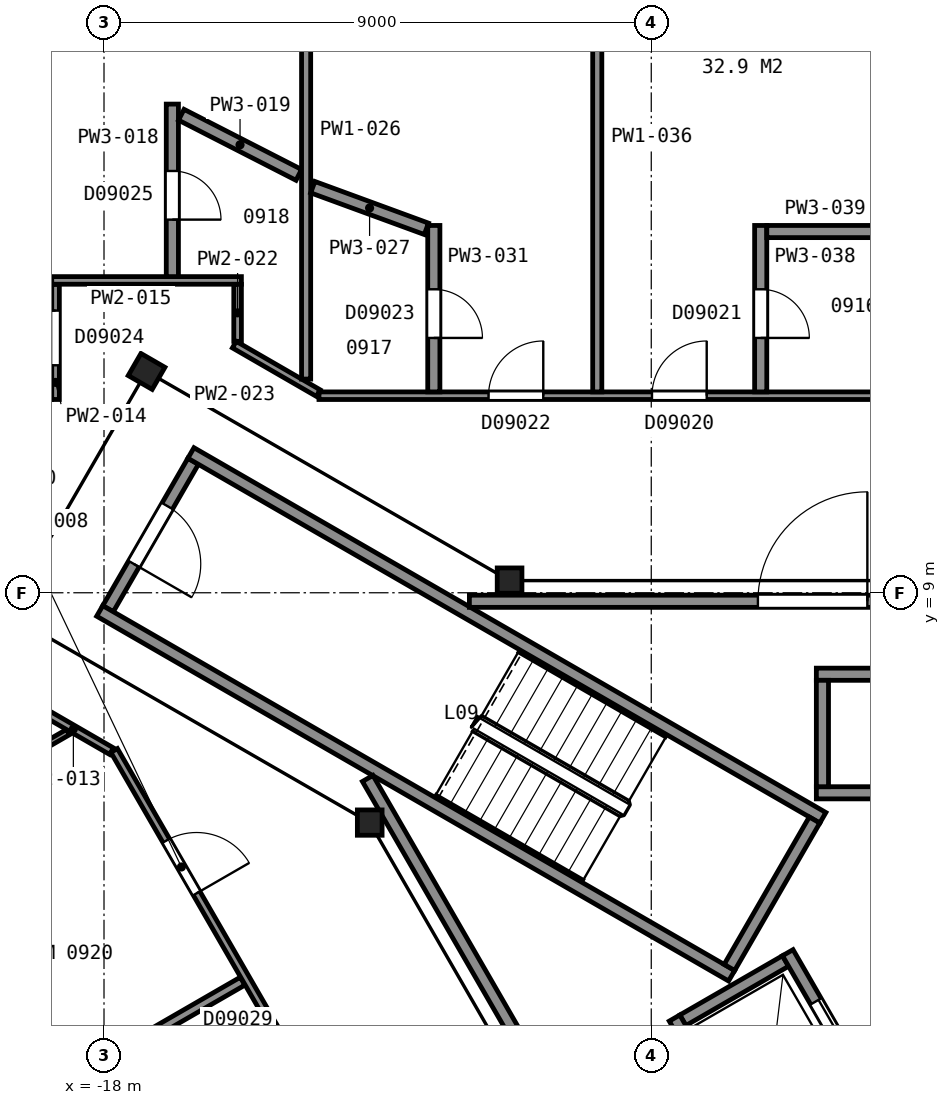
"""IFC4 building model, lengths in metres.
Left out: names, types, materials, properties, quantities, classifications, styles, units other than length and angle.
Written with IfcOpenShell. Run it as: python <this file> out.ifc"""

import sys

from ifc_helpers import new_model, si_unit, direction, frame, frame_2d, origin, origin_2d, place, context, subcontext, project, spatial, rectangle, i_section, extrude, element, fill, save


model = new_model("IFC4")
c1 = context("Model", 3, precision=1e-05, world=origin(), true_north=direction((0.0, 1.0)))
c2 = subcontext(c1, "Body", "Model", "MODEL_VIEW")
j1 = project(units=[si_unit("LENGTHUNIT", "METRE"), si_unit("PLANEANGLEUNIT", "RADIAN")], contexts=[c1])
p1 = place(None, origin())
s1 = spatial("IfcSite", under=j1, at=p1, CompositionType="ELEMENT")
p2 = place(p1, origin())
s2 = spatial("IfcBuilding", under=s1, at=p2, CompositionType="ELEMENT")
p3 = place(p2, frame((0.0, 0.0, 47.6)))
s3 = spatial("IfcBuildingStorey", under=s2, at=p3, CompositionType="ELEMENT", Elevation=47.6)
p4 = place(p3, frame((-11.33, 9.2, 0.0), z_axis=(0.0, 0.0, 1.0), x_axis=(1.0, 0.0, 0.0)))
e1 = element("IfcColumn", 1, at=p4, inside=s3, PredefinedType="COLUMN", context=c2, shape_type="SweptSolid", body=[
    extrude(i_section(OverallWidth=0.406, OverallDepth=0.417, WebThickness=0.03, FlangeThickness=0.048, FilletRadius=0.015, at=origin_2d()), origin(), (0.0, 0.0, 1.0), 3.6),
])
p5 = place(p3, frame((-17.3, 12.64, 0.0), z_axis=(0.0, 0.0, 1.0), x_axis=(0.5, 0.866025403784, 0.0)))
e2 = element("IfcColumn", 2, at=p5, inside=s3, PredefinedType="COLUMN", context=c2, shape_type="SweptSolid", body=[
    extrude(i_section(OverallWidth=0.419, OverallDepth=0.455, WebThickness=0.042, FlangeThickness=0.068, FilletRadius=0.015, at=origin_2d()), origin(), (0.0, 0.0, 1.0), 3.6),
])
p6 = place(p3, frame((-13.63, 5.22, 0.0), z_axis=(0.0, 0.0, 1.0), x_axis=(1.0, 0.0, 0.0)))
e3 = element("IfcColumn", 3, at=p6, inside=s3, PredefinedType="COLUMN", context=c2, shape_type="SweptSolid", body=[
    extrude(i_section(OverallWidth=0.406, OverallDepth=0.417, WebThickness=0.03, FlangeThickness=0.048, FilletRadius=0.015, at=origin_2d()), origin(), (0.0, 0.0, 1.0), 3.6),
])
p7 = place(p3, frame((-16.534, 11.162, 0.0), z_axis=(0.0, 0.0, 1.0), x_axis=(-0.49998411664, -0.866034573852, 0.0)))
e4 = element("IfcWall", 4, at=p7, inside=s3, PredefinedType="PARTITIONING", context=c2, shape_type="SweptSolid", body=[
    extrude(rectangle(XDim=2.8, YDim=0.2, at=frame_2d((1.4, 0.0))), origin(), (0.0, 0.0, 1.0), 3.35),
])
p8 = place(p7, frame((0.85, 0.0, 0.0)))
e5 = element("IfcOpeningElement", 5, at=p8, cuts=e4, PredefinedType="OPENING", context=c2, shape_type="SweptSolid", body=[
    extrude(rectangle(XDim=1.1, YDim=2.1, at=frame_2d((0.55, 1.05))), frame((0.0, 0.11, 0.0), z_axis=(0.0, -1.0, 0.0), x_axis=(1.0, 0.0, 0.0)), (0.0, 0.0, 1.0), 0.22),
])
for number, where, z_axis, x_axis in (
    (6, (-7.678, 2.701, 0.0), (0.0, 0.0, 1.0), (-0.866, 0.5, 0.0)),
    (7, (-6.178, 5.299, 0.0), (0.0, 0.0, 1.0), (-0.866, 0.5, 0.0)),
):
    element("IfcWall", number, at=place(p3, frame(where, z_axis=z_axis, x_axis=x_axis)), inside=s3, PredefinedType="PARTITIONING", context=c2, shape_type="SweptSolid", body=[
        extrude(rectangle(XDim=12.0, YDim=0.2, at=frame_2d((6.0, 0.0))), origin(), (0.0, 0.0, 1.0), 3.35),
    ])
p9 = place(p3, frame((-6.315, 5.262, 0.0), z_axis=(0.0, 0.0, 1.0), x_axis=(-0.500049511043, -0.865996816683, 0.0)))
e8 = element("IfcWall", 8, at=p9, inside=s3, PredefinedType="PARTITIONING", context=c2, shape_type="SweptSolid", body=[
    extrude(rectangle(XDim=2.8, YDim=0.2, at=frame_2d((1.4, 0.0))), origin(), (0.0, 0.0, 1.0), 3.35),
])
for number, where, z_axis, x_axis in (
    (9, (-6.285, 5.71, 0.0), (0.0, 0.0, 1.0), (1.0, 0.0, 0.0)),
    (10, (-6.285, 7.66, 0.0), (0.0, 0.0, 1.0), (1.0, 0.0, 0.0)),
):
    element("IfcWall", number, at=place(p3, frame(where, z_axis=z_axis, x_axis=x_axis)), inside=s3, PredefinedType="PARTITIONING", context=c2, shape_type="SweptSolid", body=[
        extrude(rectangle(XDim=2.35, YDim=0.2, at=frame_2d((1.175, 0.0))), origin(), (0.0, 0.0, 1.0), 3.6),
    ])
p10 = place(p3, frame((-8.48, 1.969, 0.0), z_axis=(0.0, 0.0, 1.0), x_axis=(0.866000020948, 0.500043961785, 0.0)))
e11 = element("IfcWall", 11, at=p10, inside=s3, PredefinedType="PARTITIONING", context=c2, shape_type="SweptSolid", body=[
    extrude(rectangle(XDim=1.95, YDim=0.2, at=frame_2d((0.975, 0.0))), origin(), (0.0, 0.0, 1.0), 3.6),
])
p11 = place(p3, frame((-6.185, 5.81, 0.0), z_axis=(0.0, 0.0, 1.0), x_axis=(0.0, 1.0, 0.0)))
e12 = element("IfcWall", 12, at=p11, inside=s3, PredefinedType="PARTITIONING", context=c2, shape_type="SweptSolid", body=[
    extrude(rectangle(XDim=1.75, YDim=0.2, at=frame_2d((0.875, 0.0))), origin(), (0.0, 0.0, 1.0), 3.6),
])
p12 = place(p3, frame((-5.28, 0.525, 0.0), z_axis=(0.0, 0.0, 1.0), x_axis=(-0.500037662692, 0.866003658127, 0.0)))
e13 = element("IfcWall", 13, at=p12, inside=s3, PredefinedType="PARTITIONING", context=c2, shape_type="SweptSolid", body=[
    extrude(rectangle(XDim=2.95, YDim=0.2, at=frame_2d((1.475, 0.0))), origin(), (0.0, 0.0, 1.0), 3.6),
])
p13 = place(p12, frame((0.925, 0.0, 0.0)))
e14 = element("IfcOpeningElement", 14, at=p13, cuts=e13, PredefinedType="OPENING", context=c2, shape_type="SweptSolid", body=[
    extrude(rectangle(XDim=1.1, YDim=2.1, at=frame_2d((0.55, 1.05))), frame((0.0, 0.11, 0.0), z_axis=(0.0, -1.0, 0.0), x_axis=(1.0, 0.0, 0.0)), (0.0, 0.0, 1.0), 0.22),
])
p14 = place(p3, frame((-7.242, -0.376, 0.0), z_axis=(0.0, 0.0, 1.0), x_axis=(-0.499996545922, 0.866027397988, 0.0)))
e15 = element("IfcWall", 15, at=p14, inside=s3, PredefinedType="PARTITIONING", context=c2, shape_type="SweptSolid", body=[
    extrude(rectangle(XDim=2.75, YDim=0.2, at=frame_2d((1.375, 0.0))), origin(), (0.0, 0.0, 1.0), 3.6),
])
p15 = place(p3, frame((-13.664, 5.946, 0.0), z_axis=(0.0, 0.0, 1.0), x_axis=(0.499994327219, -0.866028678941, 0.0)))
e16 = element("IfcWall", 16, at=p15, inside=s3, PredefinedType="PARTITIONING", context=c2, shape_type="SweptSolid", body=[
    extrude(rectangle(XDim=23.968, YDim=0.2, at=frame_2d((11.984, 0.0))), origin(), (0.0, 0.0, 1.0), 3.35),
])
p16 = place(p3, frame((0.263, 8.86, 0.0), z_axis=(0.0, 0.0, 1.0), x_axis=(-1.0, 0.0, 0.0)))
e17 = element("IfcWall", 17, at=p16, inside=s3, PredefinedType="PARTITIONING", context=c2, shape_type="SweptSolid", body=[
    extrude(rectangle(XDim=12.254, YDim=0.2, at=frame_2d((6.127, 0.0))), origin(), (0.0, 0.0, 1.0), 3.35),
])
p17 = place(p16, frame((5.709, 0.0, 0.0)))
e18 = element("IfcOpeningElement", 18, at=p17, cuts=e17, PredefinedType="OPENING", context=c2, shape_type="SweptSolid", body=[
    extrude(rectangle(XDim=1.8, YDim=2.1, at=frame_2d((0.9, 1.05))), frame((0.0, 0.11, 0.0), z_axis=(0.0, -1.0, 0.0), x_axis=(1.0, 0.0, 0.0)), (0.0, 0.0, 1.0), 0.22),
])
p18 = place(p3, frame((-25.476, 2.735, 0.0), z_axis=(0.0, 0.0, 1.0), x_axis=(0.866077639848, 0.499909513568, 0.0)))
e19 = element("IfcWall", 19, at=p18, inside=s3, PredefinedType="PARTITIONING", context=c2, shape_type="SweptSolid", body=[
    extrude(rectangle(XDim=7.946, YDim=0.1, at=frame_2d((3.973, 0.0))), origin(), (0.0, 0.0, 1.0), 2.613),
])
p19 = place(p18, frame((3.604, 0.0, 0.0)))
e20 = element("IfcOpeningElement", 20, at=p19, cuts=e19, PredefinedType="OPENING", context=c2, shape_type="SweptSolid", body=[
    extrude(rectangle(XDim=0.9, YDim=2.1, at=frame_2d((0.45, 1.05))), frame((0.0, 0.06, 0.0), z_axis=(0.0, -1.0, 0.0), x_axis=(1.0, 0.0, 0.0)), (0.0, 0.0, 1.0), 0.12),
])
p20 = place(p3, frame((-22.984, -1.581, 0.0), z_axis=(0.0, 0.0, 1.0), x_axis=(0.866040157966, 0.499974444137, 0.0)))
e21 = element("IfcWall", 21, at=p20, inside=s3, PredefinedType="PARTITIONING", context=c2, shape_type="SweptSolid", body=[
    extrude(rectangle(XDim=8.387, YDim=0.15, at=frame_2d((4.193, 0.0))), origin(), (0.0, 0.0, 1.0), 2.613),
])
p21 = place(p3, frame((-19.132, 7.121, 0.0), z_axis=(0.0, 0.0, 1.0), x_axis=(0.865894215669, -0.500227155672, 0.0)))
e22 = element("IfcWall", 22, at=p21, inside=s3, PredefinedType="PARTITIONING", context=c2, shape_type="SweptSolid", body=[
    extrude(rectangle(XDim=1.451, YDim=0.125, at=frame_2d((0.726, 0.0))), origin(), (0.0, 0.0, 1.0), 2.613),
])
p22 = place(p3, frame((-18.797, 12.178, 0.0), z_axis=(0.0, 0.0, 1.0), x_axis=(0.0, 1.0, 0.0)))
e23 = element("IfcWall", 23, at=p22, inside=s3, PredefinedType="PARTITIONING", context=c2, shape_type="SweptSolid", body=[
    extrude(rectangle(XDim=1.894, YDim=0.125, at=frame_2d((0.947, 0.0))), origin(), (0.0, 0.0, 1.0), 2.613),
])
p23 = place(p22, frame((0.562, 0.0, 0.0)))
e24 = element("IfcOpeningElement", 24, at=p23, cuts=e23, PredefinedType="OPENING", context=c2, shape_type="SweptSolid", body=[
    extrude(rectangle(XDim=0.9, YDim=2.1, at=frame_2d((0.45, 1.05))), frame((0.0, 0.073, 0.0), z_axis=(0.0, -1.0, 0.0), x_axis=(1.0, 0.0, 0.0)), (0.0, 0.0, 1.0), 0.145),
])
p24 = place(p3, frame((-18.86, 14.137, 0.0), z_axis=(0.0, 0.0, 1.0), x_axis=(1.0, 0.0, 0.0)))
e25 = element("IfcWall", 25, at=p24, inside=s3, PredefinedType="PARTITIONING", context=c2, shape_type="SweptSolid", body=[
    extrude(rectangle(XDim=3.119, YDim=0.125, at=frame_2d((1.56, 0.0))), origin(), (0.0, 0.0, 1.0), 2.613),
])
p25 = place(p3, frame((-3.766, -17.959, 0.0), z_axis=(0.0, 0.0, 1.0), x_axis=(-0.500002884005, 0.866023738697, 0.0)))
e26 = element("IfcWall", 26, at=p25, inside=s3, PredefinedType="PARTITIONING", context=c2, shape_type="SweptSolid", body=[
    extrude(rectangle(XDim=28.135, YDim=0.125, at=frame_2d((14.067, 0.0))), origin(), (0.0, 0.0, 1.0), 2.613),
])
p26 = place(p25, frame((25.422, 0.0, 0.0)))
e27 = element("IfcOpeningElement", 27, at=p26, cuts=e26, PredefinedType="OPENING", context=c2, shape_type="SweptSolid", body=[
    extrude(rectangle(XDim=1.0, YDim=2.1, at=frame_2d((0.5, 1.05))), frame((0.0, 0.073, 0.0), z_axis=(0.0, -1.0, 0.0), x_axis=(1.0, 0.0, 0.0)), (0.0, 0.0, 1.0), 0.145),
])
p27 = place(p25, frame((21.693, 0.0, 0.0)))
e28 = element("IfcOpeningElement", 28, at=p27, cuts=e26, PredefinedType="OPENING", context=c2, shape_type="SweptSolid", body=[
    extrude(rectangle(XDim=0.9, YDim=2.1, at=frame_2d((0.45, 1.05))), frame((0.0, 0.073, 0.0), z_axis=(0.0, -1.0, 0.0), x_axis=(1.0, 0.0, 0.0)), (0.0, 0.0, 1.0), 0.145),
])
p28 = place(p25, frame((14.438, 0.0, 0.0)))
e29 = element("IfcOpeningElement", 29, at=p28, cuts=e26, PredefinedType="OPENING", context=c2, shape_type="SweptSolid", body=[
    extrude(rectangle(XDim=0.9, YDim=2.1, at=frame_2d((0.45, 1.05))), frame((0.0, 0.073, 0.0), z_axis=(0.0, -1.0, 0.0), x_axis=(1.0, 0.0, 0.0)), (0.0, 0.0, 1.0), 0.145),
])
p29 = place(p25, frame((11.712, 0.0, 0.0)))
e30 = element("IfcOpeningElement", 30, at=p29, cuts=e26, PredefinedType="OPENING", context=c2, shape_type="SweptSolid", body=[
    extrude(rectangle(XDim=0.9, YDim=2.1, at=frame_2d((0.45, 1.05))), frame((0.0, 0.073, 0.0), z_axis=(0.0, -1.0, 0.0), x_axis=(1.0, 0.0, 0.0)), (0.0, 0.0, 1.0), 0.145),
])
p30 = place(p25, frame((4.787, 0.0, 0.0)))
e31 = element("IfcOpeningElement", 31, at=p30, cuts=e26, PredefinedType="OPENING", context=c2, shape_type="SweptSolid", body=[
    extrude(rectangle(XDim=0.9, YDim=2.1, at=frame_2d((0.45, 1.05))), frame((0.0, 0.073, 0.0), z_axis=(0.0, -1.0, 0.0), x_axis=(1.0, 0.0, 0.0)), (0.0, 0.0, 1.0), 0.145),
])
p31 = place(p25, frame((1.762, 0.0, 0.0)))
e32 = element("IfcOpeningElement", 32, at=p31, cuts=e26, PredefinedType="OPENING", context=c2, shape_type="SweptSolid", body=[
    extrude(rectangle(XDim=0.9, YDim=2.1, at=frame_2d((0.45, 1.05))), frame((0.0, 0.073, 0.0), z_axis=(0.0, -1.0, 0.0), x_axis=(1.0, 0.0, 0.0)), (0.0, 0.0, 1.0), 0.145),
])
p32 = place(p3, frame((-16.876, 17.037, 0.0), z_axis=(0.0, 0.0, 1.0), x_axis=(0.0, -1.0, 0.0)))
e33 = element("IfcWall", 33, at=p32, inside=s3, PredefinedType="PARTITIONING", context=c2, shape_type="SweptSolid", body=[
    extrude(rectangle(XDim=2.838, YDim=0.2, at=frame_2d((1.419, 0.0))), origin(), (0.0, 0.0, 1.0), 2.613),
])
p33 = place(p32, frame((1.1, 0.0, 0.0)))
e34 = element("IfcOpeningElement", 34, at=p33, cuts=e33, PredefinedType="OPENING", context=c2, shape_type="SweptSolid", body=[
    extrude(rectangle(XDim=0.8, YDim=2.1, at=frame_2d((0.4, 1.05))), frame((0.0, 0.11, 0.0), z_axis=(0.0, -1.0, 0.0), x_axis=(1.0, 0.0, 0.0)), (0.0, 0.0, 1.0), 0.22),
])
p34 = place(p3, frame((-16.729, 16.862, 0.0), z_axis=(0.0, 0.0, 1.0), x_axis=(0.890181338078, -0.455606392995, 0.0)))
e35 = element("IfcWall", 35, at=p34, inside=s3, PredefinedType="PARTITIONING", context=c2, shape_type="SweptSolid", body=[
    extrude(rectangle(XDim=2.171, YDim=0.2, at=frame_2d((1.085, 0.0))), origin(), (0.0, 0.0, 1.0), 2.613),
])
p35 = place(p3, frame((-15.803, 13.135, 0.0), z_axis=(0.0, 0.0, 1.0), x_axis=(0.0, 1.0, 0.0)))
e36 = element("IfcWall", 36, at=p35, inside=s3, PredefinedType="PARTITIONING", context=c2, shape_type="SweptSolid", body=[
    extrude(rectangle(XDim=0.937, YDim=0.125, at=frame_2d((0.469, 0.0))), origin(), (0.0, 0.0, 1.0), 2.613),
])
p36 = place(p3, frame((-15.857, 13.081, 0.0), z_axis=(0.0, 0.0, 1.0), x_axis=(0.865974057503, -0.500088923824, 0.0)))
e37 = element("IfcWall", 37, at=p36, inside=s3, PredefinedType="PARTITIONING", context=c2, shape_type="SweptSolid", body=[
    extrude(rectangle(XDim=1.595, YDim=0.125, at=frame_2d((0.798, 0.0))), origin(), (0.0, 0.0, 1.0), 2.613),
])
p37 = place(p3, frame((-14.676, 12.514, 0.0), z_axis=(0.0, 0.0, 1.0), x_axis=(0.0, 1.0, 0.0)))
e38 = element("IfcWall", 38, at=p37, inside=s3, PredefinedType="PARTITIONING", context=c2, shape_type="SweptSolid", body=[
    extrude(rectangle(XDim=8.181, YDim=0.15, at=frame_2d((4.09, 0.0))), origin(), (0.0, 0.0, 1.0), 2.613),
])
p38 = place(p3, frame((-14.567, 15.671, 0.0), z_axis=(0.0, 0.0, 1.0), x_axis=(0.938894816734, -0.344204188105, 0.0)))
e39 = element("IfcWall", 39, at=p38, inside=s3, PredefinedType="PARTITIONING", context=c2, shape_type="SweptSolid", body=[
    extrude(rectangle(XDim=1.99, YDim=0.2, at=frame_2d((0.995, 0.0))), origin(), (0.0, 0.0, 1.0), 2.613),
])
p39 = place(p3, frame((-14.465, 12.241, 0.0), z_axis=(0.0, 0.0, 1.0), x_axis=(1.0, 0.0, 0.0)))
e40 = element("IfcWall", 40, at=p39, inside=s3, PredefinedType="PARTITIONING", context=c2, shape_type="SweptSolid", body=[
    extrude(rectangle(XDim=28.929, YDim=0.125, at=frame_2d((14.465, 0.0))), origin(), (0.0, 0.0, 1.0), 2.613),
])
p40 = place(p39, frame((25.252, 0.0, 0.0)))
e41 = element("IfcOpeningElement", 41, at=p40, cuts=e40, PredefinedType="OPENING", context=c2, shape_type="SweptSolid", body=[
    extrude(rectangle(XDim=0.9, YDim=2.1, at=frame_2d((0.45, 1.05))), frame((0.0, 0.073, 0.0), z_axis=(0.0, -1.0, 0.0), x_axis=(1.0, 0.0, 0.0)), (0.0, 0.0, 1.0), 0.145),
])
p41 = place(p39, frame((22.564, 0.0, 0.0)))
e42 = element("IfcOpeningElement", 42, at=p41, cuts=e40, PredefinedType="OPENING", context=c2, shape_type="SweptSolid", body=[
    extrude(rectangle(XDim=0.9, YDim=2.1, at=frame_2d((0.45, 1.05))), frame((0.0, 0.073, 0.0), z_axis=(0.0, -1.0, 0.0), x_axis=(1.0, 0.0, 0.0)), (0.0, 0.0, 1.0), 0.145),
])
p42 = place(p39, frame((15.302, 0.0, 0.0)))
e43 = element("IfcOpeningElement", 43, at=p42, cuts=e40, PredefinedType="OPENING", context=c2, shape_type="SweptSolid", body=[
    extrude(rectangle(XDim=0.9, YDim=2.1, at=frame_2d((0.45, 1.05))), frame((0.0, 0.073, 0.0), z_axis=(0.0, -1.0, 0.0), x_axis=(1.0, 0.0, 0.0)), (0.0, 0.0, 1.0), 0.145),
])
p43 = place(p39, frame((12.365, 0.0, 0.0)))
e44 = element("IfcOpeningElement", 44, at=p43, cuts=e40, PredefinedType="OPENING", context=c2, shape_type="SweptSolid", body=[
    extrude(rectangle(XDim=0.9, YDim=2.1, at=frame_2d((0.45, 1.05))), frame((0.0, 0.073, 0.0), z_axis=(0.0, -1.0, 0.0), x_axis=(1.0, 0.0, 0.0)), (0.0, 0.0, 1.0), 0.145),
])
p44 = place(p39, frame((5.477, 0.0, 0.0)))
e45 = element("IfcOpeningElement", 45, at=p44, cuts=e40, PredefinedType="OPENING", context=c2, shape_type="SweptSolid", body=[
    extrude(rectangle(XDim=0.9, YDim=2.1, at=frame_2d((0.45, 1.05))), frame((0.0, 0.073, 0.0), z_axis=(0.0, -1.0, 0.0), x_axis=(1.0, 0.0, 0.0)), (0.0, 0.0, 1.0), 0.145),
])
p45 = place(p39, frame((2.789, 0.0, 0.0)))
e46 = element("IfcOpeningElement", 46, at=p45, cuts=e40, PredefinedType="OPENING", context=c2, shape_type="SweptSolid", body=[
    extrude(rectangle(XDim=0.9, YDim=2.1, at=frame_2d((0.45, 1.05))), frame((0.0, 0.073, 0.0), z_axis=(0.0, -1.0, 0.0), x_axis=(1.0, 0.0, 0.0)), (0.0, 0.0, 1.0), 0.145),
])
p46 = place(p3, frame((-12.576, 12.303, 0.0), z_axis=(0.0, 0.0, 1.0), x_axis=(0.0, 1.0, 0.0)))
e47 = element("IfcWall", 47, at=p46, inside=s3, PredefinedType="PARTITIONING", context=c2, shape_type="SweptSolid", body=[
    extrude(rectangle(XDim=2.738, YDim=0.2, at=frame_2d((1.369, 0.0))), origin(), (0.0, 0.0, 1.0), 2.613),
])
p47 = place(p46, frame((0.887, 0.0, 0.0)))
e48 = element("IfcOpeningElement", 48, at=p47, cuts=e47, PredefinedType="OPENING", context=c2, shape_type="SweptSolid", body=[
    extrude(rectangle(XDim=0.8, YDim=2.1, at=frame_2d((0.4, 1.05))), frame((0.0, 0.11, 0.0), z_axis=(0.0, -1.0, 0.0), x_axis=(1.0, 0.0, 0.0)), (0.0, 0.0, 1.0), 0.22),
])
p48 = place(p3, frame((-9.888, 12.303, 0.0), z_axis=(0.0, 0.0, 1.0), x_axis=(0.0, 1.0, 0.0)))
e49 = element("IfcWall", 49, at=p48, inside=s3, PredefinedType="PARTITIONING", context=c2, shape_type="SweptSolid", body=[
    extrude(rectangle(XDim=8.392, YDim=0.15, at=frame_2d((4.196, 0.0))), origin(), (0.0, 0.0, 1.0), 2.613),
])
p49 = place(p3, frame((-7.2, 15.041, 0.0), z_axis=(0.0, 0.0, 1.0), x_axis=(0.0, -1.0, 0.0)))
e50 = element("IfcWall", 50, at=p49, inside=s3, PredefinedType="PARTITIONING", context=c2, shape_type="SweptSolid", body=[
    extrude(rectangle(XDim=2.738, YDim=0.2, at=frame_2d((1.369, 0.0))), origin(), (0.0, 0.0, 1.0), 2.613),
])
p50 = place(p49, frame((1.05, 0.0, 0.0)))
e51 = element("IfcOpeningElement", 51, at=p50, cuts=e50, PredefinedType="OPENING", context=c2, shape_type="SweptSolid", body=[
    extrude(rectangle(XDim=0.8, YDim=2.1, at=frame_2d((0.4, 1.05))), frame((0.0, 0.11, 0.0), z_axis=(0.0, -1.0, 0.0), x_axis=(1.0, 0.0, 0.0)), (0.0, 0.0, 1.0), 0.22),
])
p51 = place(p3, frame((-7.1, 14.941, 0.0), z_axis=(0.0, 0.0, 1.0), x_axis=(1.0, 0.0, 0.0)))
e52 = element("IfcWall", 52, at=p51, inside=s3, PredefinedType="PARTITIONING", context=c2, shape_type="SweptSolid", body=[
    extrude(rectangle(XDim=1.92, YDim=0.2, at=frame_2d((0.96, 0.0))), origin(), (0.0, 0.0, 1.0), 2.613),
])
p52 = place(p8, origin())
e53 = element("IfcDoor", 53, at=p52, inside=s3, OperationType="SINGLE_SWING_RIGHT", PredefinedType="DOOR", context=c2, shape_type="SweptSolid", body=[
    extrude(rectangle(XDim=1.1, YDim=2.1, at=frame_2d((0.55, 1.05))), frame((0.0, 0.025, 0.0), z_axis=(0.0, -1.0, 0.0), x_axis=(1.0, 0.0, 0.0)), (0.0, 0.0, 1.0), 0.05),
])
fill(e5, e53)
p53 = place(p13, origin())
e54 = element("IfcDoor", 54, at=p53, inside=s3, OperationType="SLIDING_TO_LEFT", PredefinedType="DOOR", context=c2, shape_type="SweptSolid", body=[
    extrude(rectangle(XDim=1.1, YDim=2.1, at=frame_2d((0.55, 1.05))), frame((0.0, 0.025, 0.0), z_axis=(0.0, -1.0, 0.0), x_axis=(1.0, 0.0, 0.0)), (0.0, 0.0, 1.0), 0.05),
])
fill(e14, e54)
p54 = place(p17, origin())
e55 = element("IfcDoor", 55, at=p54, inside=s3, OperationType="DOUBLE_DOOR_SINGLE_SWING", PredefinedType="DOOR", context=c2, shape_type="SweptSolid", body=[
    extrude(rectangle(XDim=1.8, YDim=2.1, at=frame_2d((0.9, 1.05))), frame((0.0, 0.025, 0.0), z_axis=(0.0, -1.0, 0.0), x_axis=(1.0, 0.0, 0.0)), (0.0, 0.0, 1.0), 0.05),
])
fill(e18, e55)
p55 = place(p23, origin())
e56 = element("IfcDoor", 56, at=p55, inside=s3, OperationType="SINGLE_SWING_RIGHT", PredefinedType="DOOR", context=c2, shape_type="SweptSolid", body=[
    extrude(rectangle(XDim=0.9, YDim=2.1, at=frame_2d((0.45, 1.05))), frame((0.0, 0.025, 0.0), z_axis=(0.0, -1.0, 0.0), x_axis=(1.0, 0.0, 0.0)), (0.0, 0.0, 1.0), 0.05),
])
fill(e24, e56)
p56 = place(p26, origin())
e57 = element("IfcDoor", 57, at=p56, inside=s3, OperationType="SINGLE_SWING_LEFT", PredefinedType="DOOR", context=c2, shape_type="SweptSolid", body=[
    extrude(rectangle(XDim=1.0, YDim=2.1, at=frame_2d((0.5, 1.05))), frame((0.0, 0.025, 0.0), z_axis=(0.0, -1.0, 0.0), x_axis=(1.0, 0.0, 0.0)), (0.0, 0.0, 1.0), 0.05),
])
fill(e27, e57)
p57 = place(p33, origin())
e58 = element("IfcDoor", 58, at=p57, inside=s3, OperationType="SINGLE_SWING_RIGHT", PredefinedType="DOOR", context=c2, shape_type="SweptSolid", body=[
    extrude(rectangle(XDim=0.8, YDim=2.1, at=frame_2d((0.4, 1.05))), frame((0.0, 0.025, 0.0), z_axis=(0.0, -1.0, 0.0), x_axis=(1.0, 0.0, 0.0)), (0.0, 0.0, 1.0), 0.05),
])
fill(e34, e58)
p58 = place(p44, origin())
e59 = element("IfcDoor", 59, at=p58, inside=s3, OperationType="SINGLE_SWING_RIGHT", PredefinedType="DOOR", context=c2, shape_type="SweptSolid", body=[
    extrude(rectangle(XDim=0.9, YDim=2.1, at=frame_2d((0.45, 1.05))), frame((0.0, 0.025, 0.0), z_axis=(0.0, -1.0, 0.0), x_axis=(1.0, 0.0, 0.0)), (0.0, 0.0, 1.0), 0.05),
])
fill(e45, e59)
p59 = place(p45, origin())
e60 = element("IfcDoor", 60, at=p59, inside=s3, OperationType="SINGLE_SWING_RIGHT", PredefinedType="DOOR", context=c2, shape_type="SweptSolid", body=[
    extrude(rectangle(XDim=0.9, YDim=2.1, at=frame_2d((0.45, 1.05))), frame((0.0, 0.025, 0.0), z_axis=(0.0, -1.0, 0.0), x_axis=(1.0, 0.0, 0.0)), (0.0, 0.0, 1.0), 0.05),
])
fill(e46, e60)
p60 = place(p47, origin())
e61 = element("IfcDoor", 61, at=p60, inside=s3, OperationType="SINGLE_SWING_LEFT", PredefinedType="DOOR", context=c2, shape_type="SweptSolid", body=[
    extrude(rectangle(XDim=0.8, YDim=2.1, at=frame_2d((0.4, 1.05))), frame((0.0, 0.025, 0.0), z_axis=(0.0, -1.0, 0.0), x_axis=(1.0, 0.0, 0.0)), (0.0, 0.0, 1.0), 0.05),
])
fill(e48, e61)
p61 = place(p50, origin())
e62 = element("IfcDoor", 62, at=p61, inside=s3, OperationType="SINGLE_SWING_RIGHT", PredefinedType="DOOR", context=c2, shape_type="SweptSolid", body=[
    extrude(rectangle(XDim=0.8, YDim=2.1, at=frame_2d((0.4, 1.05))), frame((0.0, 0.025, 0.0), z_axis=(0.0, -1.0, 0.0), x_axis=(1.0, 0.0, 0.0)), (0.0, 0.0, 1.0), 0.05),
])
fill(e51, e62)
save(model, sys.argv[1])
